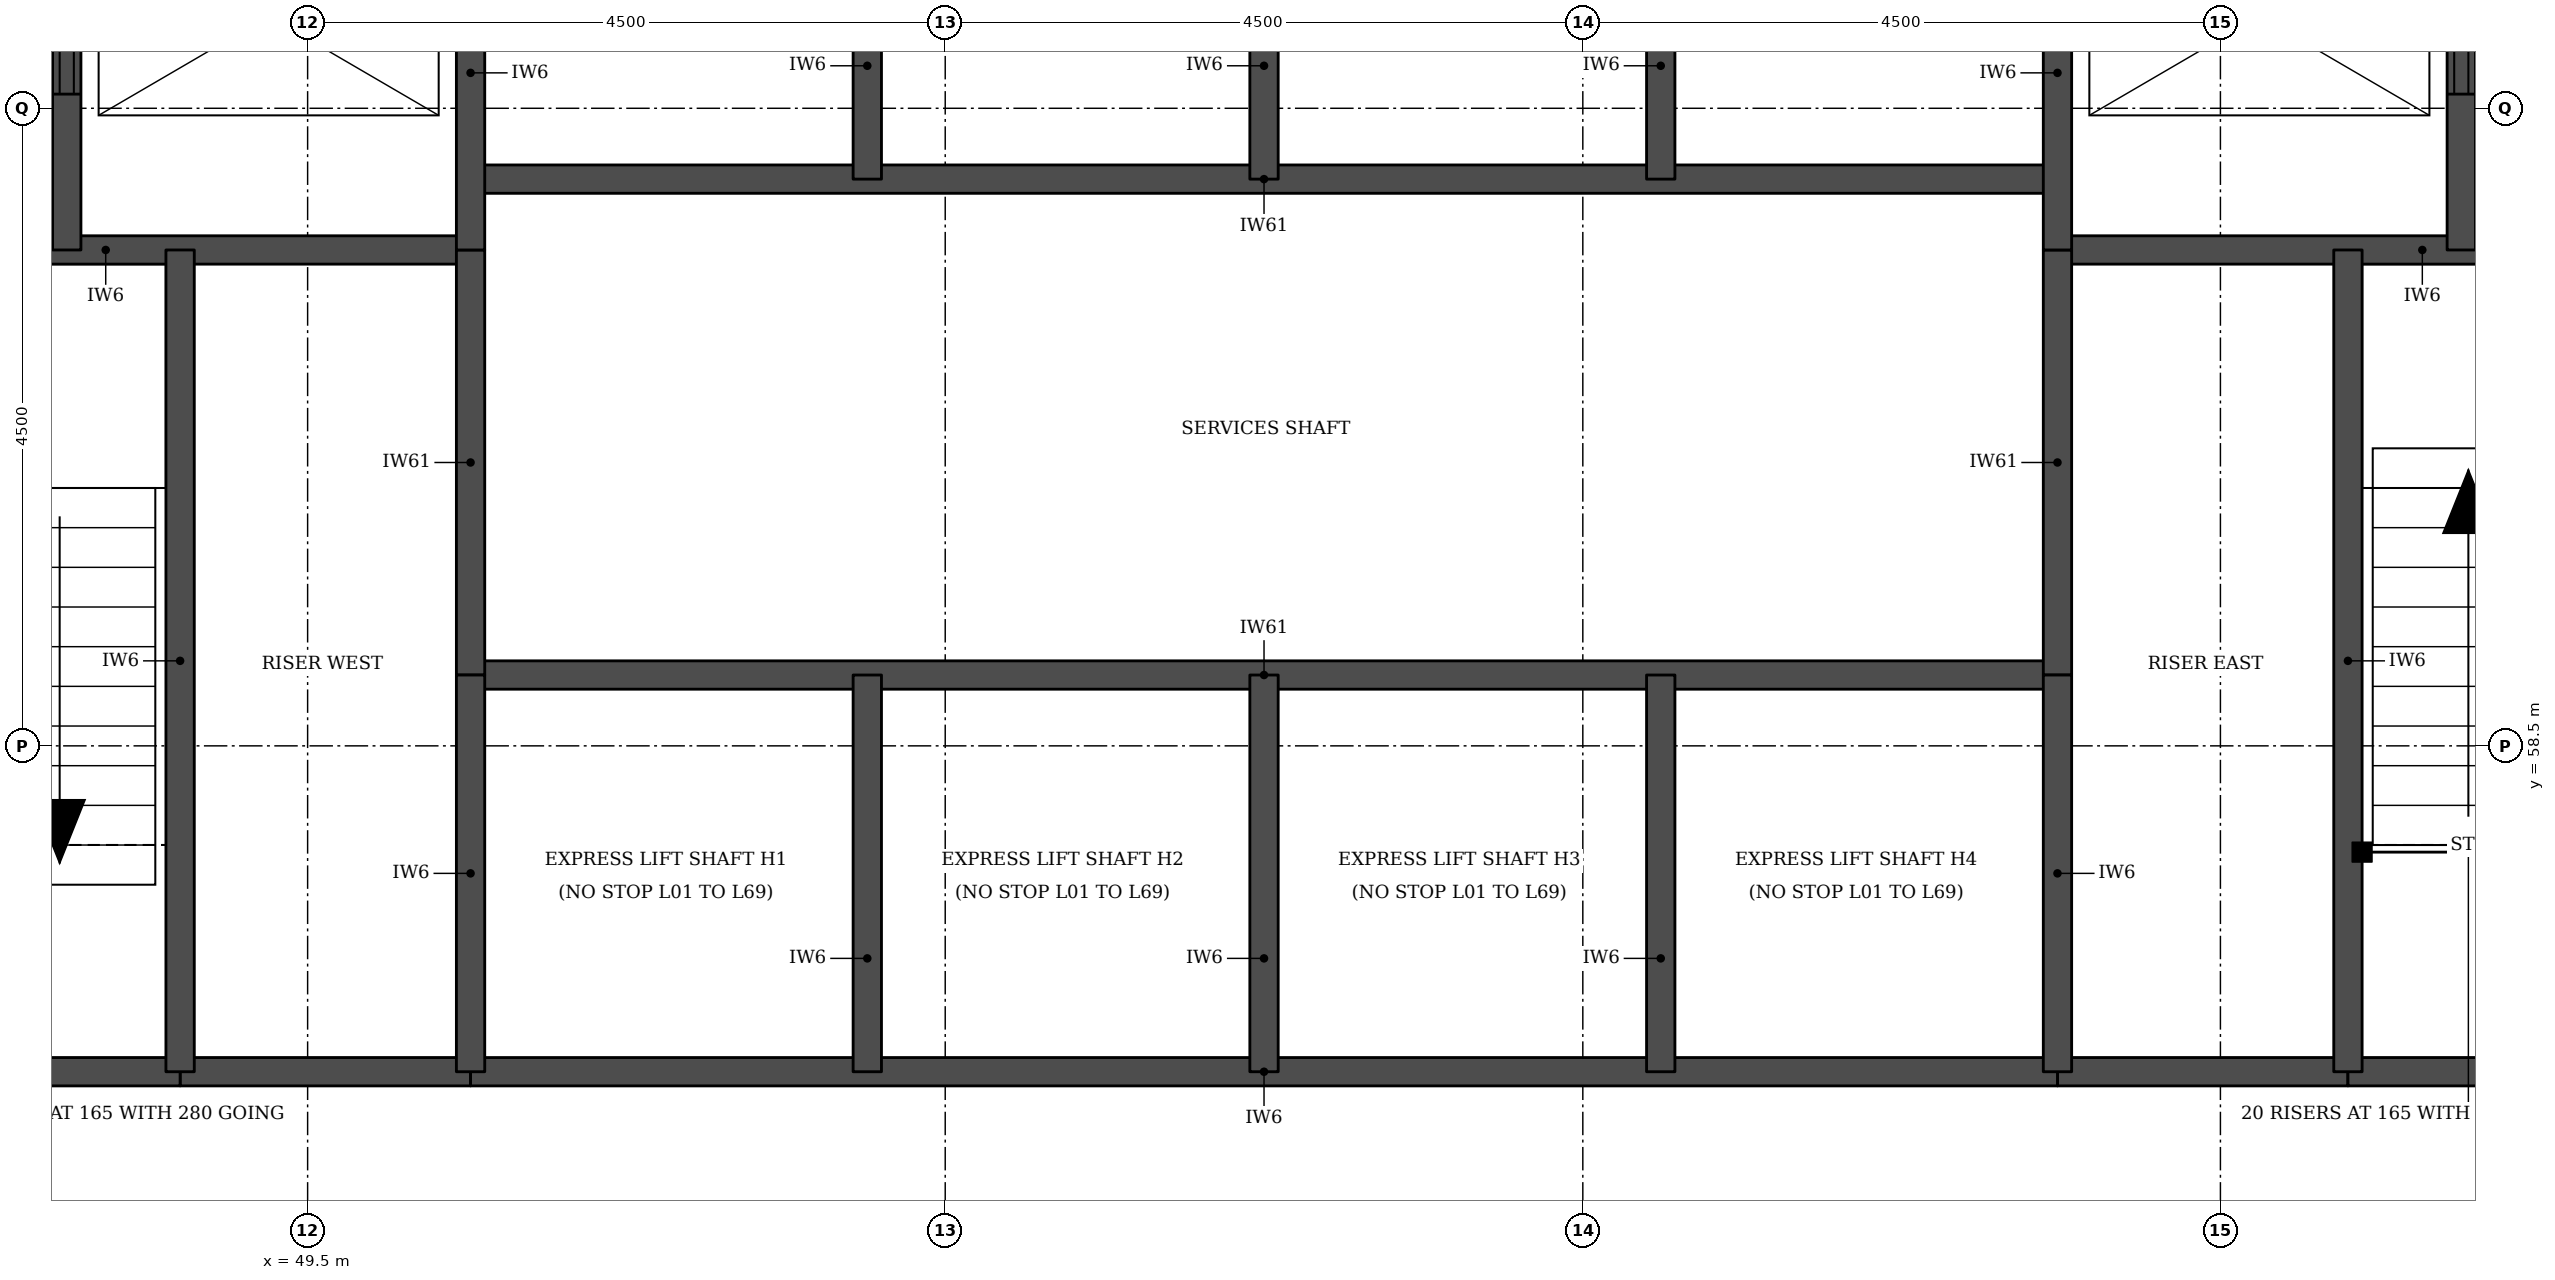
"""IFC4 building model, lengths in metres.
Left out: names, types, materials, properties, quantities, classifications, styles, units other than length and angle.
Written with IfcOpenShell. Run it as: python <this file> out.ifc"""

import sys

from ifc_helpers import new_model, si_unit, direction, frame, frame_2d, origin, place, context, subcontext, project, spatial, rectangle, extrude, element, fill, save


model = new_model("IFC4")
c1 = context("Model", 3, precision=1e-05, world=origin(), true_north=direction((0.0, 1.0)))
c2 = subcontext(c1, "Body", "Model", "MODEL_VIEW")
j1 = project(units=[si_unit("LENGTHUNIT", "METRE"), si_unit("PLANEANGLEUNIT", "RADIAN")], contexts=[c1])
p1 = place(None, origin())
s1 = spatial("IfcSite", under=j1, at=p1, CompositionType="ELEMENT")
p2 = place(p1, origin())
s2 = spatial("IfcBuilding", under=s1, at=p2, CompositionType="ELEMENT")
p3 = place(p2, frame((0.0, 0.0, 39.6)))
s3 = spatial("IfcBuildingStorey", under=s2, at=p3, CompositionType="ELEMENT", Elevation=39.6)
for number, where, z_axis, x_axis in (
    (1, (48.6, 56.2, 0.0), (0.0, 0.0, 1.0), (1.0, 0.0, 0.0)),
    (2, (61.85, 56.2, 0.0), (0.0, 0.0, 1.0), (1.0, 0.0, 0.0)),
):
    element("IfcWall", number, at=place(p3, frame(where, z_axis=z_axis, x_axis=x_axis)), inside=s3, PredefinedType="SOLIDWALL", context=c2, shape_type="SweptSolid", body=[
        extrude(rectangle(XDim=2.05, YDim=0.2, at=frame_2d((1.025, 0.0))), origin(), (0.0, 0.0, 1.0), 3.08),
    ])
p4 = place(p3, frame((45.5, 56.2, 0.0), z_axis=(0.0, 0.0, 1.0), x_axis=(1.0, 0.0, 0.0)))
e3 = element("IfcWall", 3, at=p4, inside=s3, PredefinedType="SOLIDWALL", context=c2, shape_type="SweptSolid", body=[
    extrude(rectangle(XDim=3.1, YDim=0.2, at=frame_2d((1.55, 0.0))), origin(), (0.0, 0.0, 1.0), 3.08),
])
p5 = place(p3, frame((50.65, 56.2, 0.0), z_axis=(0.0, 0.0, 1.0), x_axis=(1.0, 0.0, 0.0)))
e4 = element("IfcWall", 4, at=p5, inside=s3, PredefinedType="SOLIDWALL", context=c2, shape_type="SweptSolid", body=[
    extrude(rectangle(XDim=11.2, YDim=0.2, at=frame_2d((5.6, 0.0))), origin(), (0.0, 0.0, 1.0), 3.08),
])
p6 = place(p3, frame((63.9, 56.2, 0.0), z_axis=(0.0, 0.0, 1.0), x_axis=(1.0, 0.0, 0.0)))
e5 = element("IfcWall", 5, at=p6, inside=s3, PredefinedType="SOLIDWALL", context=c2, shape_type="SweptSolid", body=[
    extrude(rectangle(XDim=3.1, YDim=0.2, at=frame_2d((1.55, 0.0))), origin(), (0.0, 0.0, 1.0), 3.08),
])
p7 = place(p3, frame((50.65, 59.0, 0.0), z_axis=(0.0, 0.0, 1.0), x_axis=(1.0, 0.0, 0.0)))
e6 = element("IfcWall", 6, at=p7, inside=s3, PredefinedType="SOLIDWALL", context=c2, shape_type="SweptSolid", body=[
    extrude(rectangle(XDim=11.2, YDim=0.2, at=frame_2d((5.6, 0.0))), origin(), (0.0, 0.0, 1.0), 3.3),
])
for number, where, z_axis, x_axis in (
    (7, (45.5, 62.0, 0.0), (0.0, 0.0, 1.0), (1.0, 0.0, 0.0)),
    (8, (61.85, 62.0, 0.0), (0.0, 0.0, 1.0), (1.0, 0.0, 0.0)),
):
    element("IfcWall", number, at=place(p3, frame(where, z_axis=z_axis, x_axis=x_axis)), inside=s3, PredefinedType="SOLIDWALL", context=c2, shape_type="SweptSolid", body=[
        extrude(rectangle(XDim=5.15, YDim=0.2, at=frame_2d((2.575, 0.0))), origin(), (0.0, 0.0, 1.0), 3.08),
    ])
p8 = place(p3, frame((50.65, 62.5, 0.0), z_axis=(0.0, 0.0, 1.0), x_axis=(1.0, 0.0, 0.0)))
e9 = element("IfcWall", 9, at=p8, inside=s3, PredefinedType="SOLIDWALL", context=c2, shape_type="SweptSolid", body=[
    extrude(rectangle(XDim=11.2, YDim=0.2, at=frame_2d((5.6, 0.0))), origin(), (0.0, 0.0, 1.0), 3.3),
])
p9 = place(p3, frame((47.8, 62.0, 0.0), z_axis=(0.0, 0.0, 1.0), x_axis=(0.0, 1.0, 0.0)))
e10 = element("IfcWall", 10, at=p9, inside=s3, PredefinedType="SOLIDWALL", context=c2, shape_type="SweptSolid", body=[
    extrude(rectangle(XDim=3.3, YDim=0.2, at=frame_2d((1.65, 0.0))), origin(), (0.0, 0.0, 1.0), 3.08),
])
p10 = place(p9, frame((1.1, 0.0, 0.0)))
e11 = element("IfcOpeningElement", 11, at=p10, cuts=e10, PredefinedType="OPENING", context=c2, shape_type="SweptSolid", body=[
    extrude(rectangle(XDim=1.1, YDim=2.1, at=frame_2d((0.55, 1.05))), frame((0.0, 0.11, 0.0), z_axis=(0.0, -1.0, 0.0), x_axis=(1.0, 0.0, 0.0)), (0.0, 0.0, 1.0), 0.22),
])
p11 = place(p3, frame((48.6, 56.2, 0.0), z_axis=(0.0, 0.0, 1.0), x_axis=(0.0, 1.0, 0.0)))
e12 = element("IfcWall", 12, at=p11, inside=s3, PredefinedType="SOLIDWALL", context=c2, shape_type="SweptSolid", body=[
    extrude(rectangle(XDim=5.8, YDim=0.2, at=frame_2d((2.9, 0.0))), origin(), (0.0, 0.0, 1.0), 3.08),
])
p12 = place(p3, frame((50.65, 59.0, 0.0), z_axis=(0.0, 0.0, 1.0), x_axis=(0.0, 1.0, 0.0)))
e13 = element("IfcWall", 13, at=p12, inside=s3, PredefinedType="SOLIDWALL", context=c2, shape_type="SweptSolid", body=[
    extrude(rectangle(XDim=3.0, YDim=0.2, at=frame_2d((1.5, 0.0))), origin(), (0.0, 0.0, 1.0), 3.3),
])
p13 = place(p3, frame((50.65, 56.2, 0.0), z_axis=(0.0, 0.0, 1.0), x_axis=(0.0, 1.0, 0.0)))
e14 = element("IfcWall", 14, at=p13, inside=s3, PredefinedType="SOLIDWALL", context=c2, shape_type="SweptSolid", body=[
    extrude(rectangle(XDim=2.8, YDim=0.2, at=frame_2d((1.4, 0.0))), origin(), (0.0, 0.0, 1.0), 3.08),
])
p14 = place(p3, frame((50.65, 62.0, 0.0), z_axis=(0.0, 0.0, 1.0), x_axis=(0.0, 1.0, 0.0)))
e15 = element("IfcWall", 15, at=p14, inside=s3, PredefinedType="SOLIDWALL", context=c2, shape_type="SweptSolid", body=[
    extrude(rectangle(XDim=3.3, YDim=0.2, at=frame_2d((1.65, 0.0))), origin(), (0.0, 0.0, 1.0), 3.08),
])
for number, where, z_axis, x_axis in (
    (16, (53.45, 56.2, 0.0), (0.0, 0.0, 1.0), (0.0, 1.0, 0.0)),
    (17, (53.45, 62.5, 0.0), (0.0, 0.0, 1.0), (0.0, 1.0, 0.0)),
    (18, (56.25, 56.2, 0.0), (0.0, 0.0, 1.0), (0.0, 1.0, 0.0)),
    (19, (56.25, 62.5, 0.0), (0.0, 0.0, 1.0), (0.0, 1.0, 0.0)),
    (20, (59.05, 56.2, 0.0), (0.0, 0.0, 1.0), (0.0, 1.0, 0.0)),
    (21, (59.05, 62.5, 0.0), (0.0, 0.0, 1.0), (0.0, 1.0, 0.0)),
):
    element("IfcWall", number, at=place(p3, frame(where, z_axis=z_axis, x_axis=x_axis)), inside=s3, PredefinedType="SOLIDWALL", context=c2, shape_type="SweptSolid", body=[
        extrude(rectangle(XDim=2.8, YDim=0.2, at=frame_2d((1.4, 0.0))), origin(), (0.0, 0.0, 1.0), 3.08),
    ])
p15 = place(p3, frame((61.85, 59.0, 0.0), z_axis=(0.0, 0.0, 1.0), x_axis=(0.0, 1.0, 0.0)))
e22 = element("IfcWall", 22, at=p15, inside=s3, PredefinedType="SOLIDWALL", context=c2, shape_type="SweptSolid", body=[
    extrude(rectangle(XDim=3.0, YDim=0.2, at=frame_2d((1.5, 0.0))), origin(), (0.0, 0.0, 1.0), 3.3),
])
p16 = place(p3, frame((61.85, 56.2, 0.0), z_axis=(0.0, 0.0, 1.0), x_axis=(0.0, 1.0, 0.0)))
e23 = element("IfcWall", 23, at=p16, inside=s3, PredefinedType="SOLIDWALL", context=c2, shape_type="SweptSolid", body=[
    extrude(rectangle(XDim=2.8, YDim=0.2, at=frame_2d((1.4, 0.0))), origin(), (0.0, 0.0, 1.0), 3.08),
])
p17 = place(p3, frame((61.85, 62.0, 0.0), z_axis=(0.0, 0.0, 1.0), x_axis=(0.0, 1.0, 0.0)))
e24 = element("IfcWall", 24, at=p17, inside=s3, PredefinedType="SOLIDWALL", context=c2, shape_type="SweptSolid", body=[
    extrude(rectangle(XDim=3.3, YDim=0.2, at=frame_2d((1.65, 0.0))), origin(), (0.0, 0.0, 1.0), 3.08),
])
p18 = place(p3, frame((63.9, 56.2, 0.0), z_axis=(0.0, 0.0, 1.0), x_axis=(0.0, 1.0, 0.0)))
e25 = element("IfcWall", 25, at=p18, inside=s3, PredefinedType="SOLIDWALL", context=c2, shape_type="SweptSolid", body=[
    extrude(rectangle(XDim=5.8, YDim=0.2, at=frame_2d((2.9, 0.0))), origin(), (0.0, 0.0, 1.0), 3.08),
])
p19 = place(p3, frame((64.7, 62.0, 0.0), z_axis=(0.0, 0.0, 1.0), x_axis=(0.0, 1.0, 0.0)))
e26 = element("IfcWall", 26, at=p19, inside=s3, PredefinedType="SOLIDWALL", context=c2, shape_type="SweptSolid", body=[
    extrude(rectangle(XDim=3.3, YDim=0.2, at=frame_2d((1.65, 0.0))), origin(), (0.0, 0.0, 1.0), 3.08),
])
p20 = place(p19, frame((1.1, 0.0, 0.0)))
e27 = element("IfcOpeningElement", 27, at=p20, cuts=e26, PredefinedType="OPENING", context=c2, shape_type="SweptSolid", body=[
    extrude(rectangle(XDim=1.1, YDim=2.1, at=frame_2d((0.55, 1.05))), frame((0.0, 0.11, 0.0), z_axis=(0.0, -1.0, 0.0), x_axis=(1.0, 0.0, 0.0)), (0.0, 0.0, 1.0), 0.22),
])
p21 = place(p10, origin())
e28 = element("IfcDoor", 28, at=p21, inside=s3, OperationType="DOUBLE_DOOR_SLIDING", PredefinedType="DOOR", context=c2, shape_type="SweptSolid", body=[
    extrude(rectangle(XDim=1.1, YDim=2.1, at=frame_2d((0.55, 1.05))), frame((0.0, 0.025, 0.0), z_axis=(0.0, -1.0, 0.0), x_axis=(1.0, 0.0, 0.0)), (0.0, 0.0, 1.0), 0.05),
])
fill(e11, e28)
p22 = place(p20, origin())
e29 = element("IfcDoor", 29, at=p22, inside=s3, OperationType="DOUBLE_DOOR_SLIDING", PredefinedType="DOOR", context=c2, shape_type="SweptSolid", body=[
    extrude(rectangle(XDim=1.1, YDim=2.1, at=frame_2d((0.55, 1.05))), frame((0.0, 0.025, 0.0), z_axis=(0.0, -1.0, 0.0), x_axis=(1.0, 0.0, 0.0)), (0.0, 0.0, 1.0), 0.05),
])
fill(e27, e29)
save(model, sys.argv[1])
